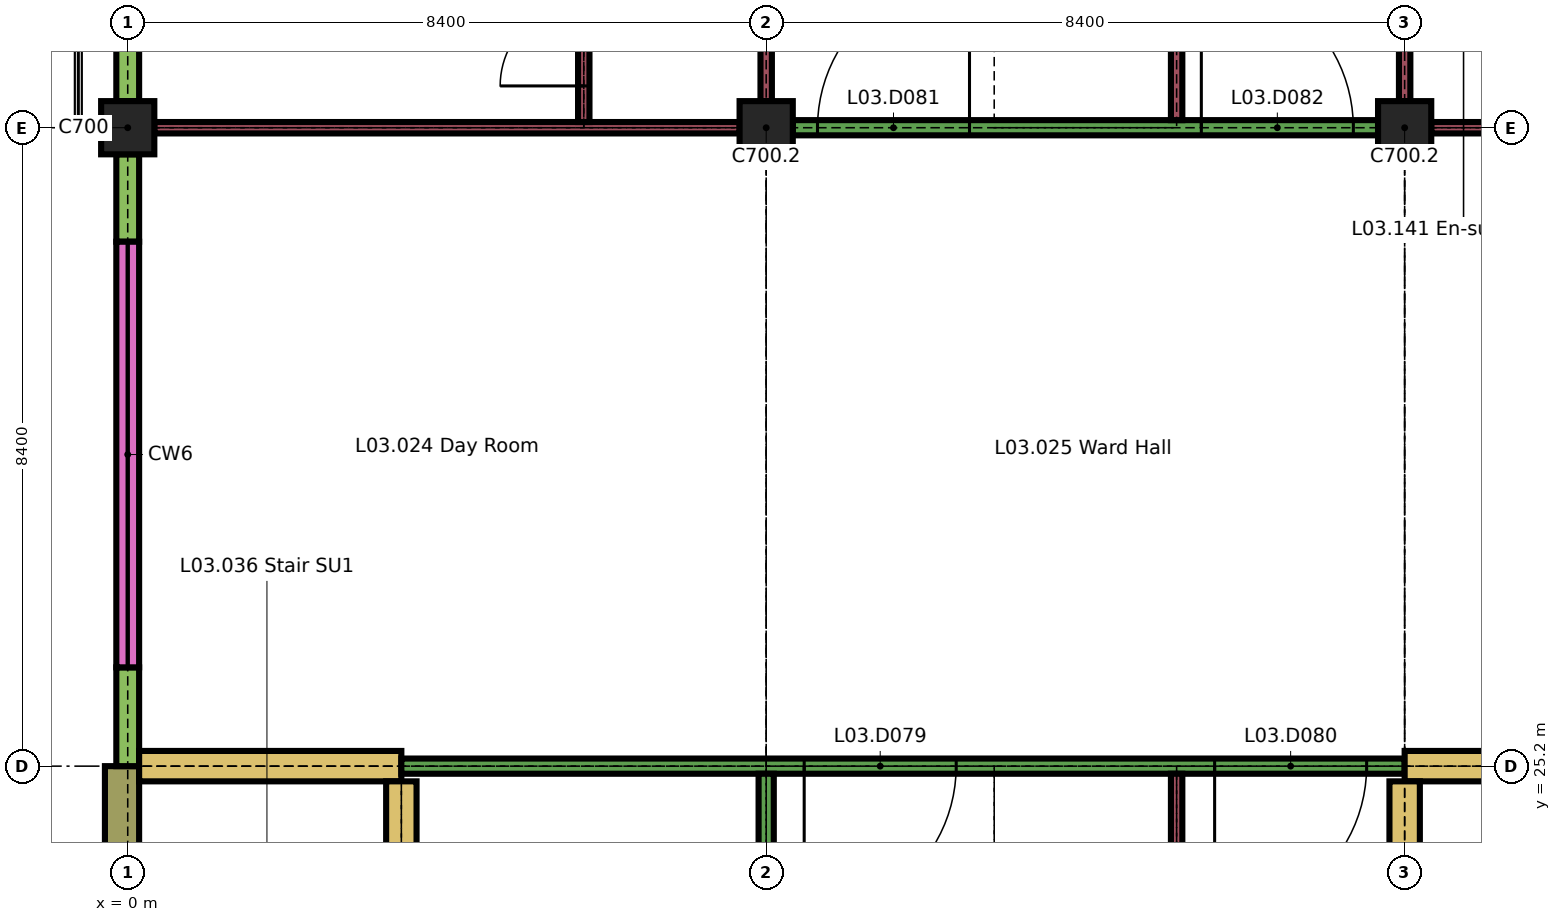
"""IFC4 building model, lengths in metres.
Left out: names, types, materials, properties, quantities, classifications, styles, units other than length and angle.
Written with IfcOpenShell. Run it as: python <this file> out.ifc"""

import sys

from ifc_helpers import new_model, si_unit, direction, frame, frame_2d, origin, origin_2d, place, context, subcontext, project, spatial, rectangle, extrude, element, fill, save


model = new_model("IFC4")
c1 = context("Model", 3, precision=1e-05, world=origin(), true_north=direction((0.0, 1.0)))
c2 = subcontext(c1, "Body", "Model", "MODEL_VIEW")
j1 = project(units=[si_unit("LENGTHUNIT", "METRE"), si_unit("PLANEANGLEUNIT", "RADIAN")], contexts=[c1])
p1 = place(None, origin())
s1 = spatial("IfcSite", under=j1, at=p1, CompositionType="ELEMENT")
p2 = place(p1, origin())
s2 = spatial("IfcBuilding", under=s1, at=p2, CompositionType="ELEMENT")
p3 = place(p2, frame((0.0, 0.0, 15.3)))
s3 = spatial("IfcBuildingStorey", under=s2, at=p3, CompositionType="ELEMENT", Elevation=15.3)
for number, where, z_axis, x_axis in (
    (1, (0.0, 33.6, 0.0), (0.0, 0.0, 1.0), (1.0, 0.0, 0.0)),
    (2, (8.4, 33.6, 0.0), (0.0, 0.0, 1.0), (1.0, 0.0, 0.0)),
    (3, (16.8, 33.6, 0.0), (0.0, 0.0, 1.0), (1.0, 0.0, 0.0)),
):
    element("IfcColumn", number, at=place(p3, frame(where, z_axis=z_axis, x_axis=x_axis)), inside=s3, PredefinedType="COLUMN", context=c2, shape_type="SweptSolid", body=[
        extrude(rectangle(XDim=0.7, YDim=0.7, at=origin_2d()), origin(), (0.0, 0.0, 1.0), 3.26),
    ])
p4 = place(p3, frame((-0.075, 21.35, 0.0), z_axis=(0.0, 0.0, 1.0), x_axis=(0.0, 1.0, 0.0)))
e4 = element("IfcWall", 4, at=p4, inside=s3, PredefinedType="SOLIDWALL", context=c2, shape_type="SweptSolid", body=[
    extrude(rectangle(XDim=3.85, YDim=0.45, at=frame_2d((1.925, 0.0))), origin(), (0.0, 0.0, 1.0), 3.26),
])
p5 = place(p3, frame((0.0, 25.2, 0.0), z_axis=(0.0, 0.0, 1.0), x_axis=(0.0, 1.0, 0.0)))
e5 = element("IfcWall", 5, at=p5, inside=s3, PredefinedType="SOLIDWALL", context=c2, shape_type="SweptSolid", body=[
    extrude(rectangle(XDim=1.3, YDim=0.3, at=frame_2d((0.65, 0.0))), origin(), (0.0, 0.0, 1.0), 2.96),
])
p6 = place(p3, frame((0.0, 32.1, 0.0), z_axis=(0.0, 0.0, 1.0), x_axis=(0.0, 1.0, 0.0)))
e6 = element("IfcWall", 6, at=p6, inside=s3, PredefinedType="SOLIDWALL", context=c2, shape_type="SweptSolid", body=[
    extrude(rectangle(XDim=1.15, YDim=0.3, at=frame_2d((0.575, 0.0))), origin(), (0.0, 0.0, 1.0), 2.96),
])
p7 = place(p3, frame((0.0, 26.5, 0.0), z_axis=(0.0, 0.0, 1.0), x_axis=(0.0, 1.0, 0.0)))
e7 = element("IfcWall", 7, at=p7, inside=s3, PredefinedType="SOLIDWALL", context=c2, shape_type="SweptSolid", body=[
    extrude(rectangle(XDim=5.6, YDim=0.3, at=frame_2d((2.8, 0.0))), origin(), (0.0, 0.0, 1.0), 0.6),
])
p8 = place(p3, frame((0.0, 33.95, 0.0), z_axis=(0.0, 0.0, 1.0), x_axis=(0.0, 1.0, 0.0)))
e8 = element("IfcWall", 8, at=p8, inside=s3, PredefinedType="SOLIDWALL", context=c2, shape_type="SweptSolid", body=[
    extrude(rectangle(XDim=3.85, YDim=0.3, at=frame_2d((1.925, 0.0))), origin(), (0.0, 0.0, 1.0), 2.96),
])
p9 = place(p8, frame((0.7, 0.0, 0.9)))
e9 = element("IfcOpeningElement", 9, at=p9, cuts=e8, PredefinedType="OPENING", context=c2, shape_type="SweptSolid", body=[
    extrude(rectangle(XDim=2.1, YDim=1.5, at=frame_2d((1.05, 0.75))), frame((0.0, 0.16, 0.0), z_axis=(0.0, -1.0, 0.0), x_axis=(1.0, 0.0, 0.0)), (0.0, 0.0, 1.0), 0.32),
])
p10 = place(p3, frame((0.15, 25.2, 0.0), z_axis=(0.0, 0.0, 1.0), x_axis=(1.0, 0.0, 0.0)))
e10 = element("IfcWall", 10, at=p10, inside=s3, PredefinedType="SHEAR", context=c2, shape_type="SweptSolid", body=[
    extrude(rectangle(XDim=3.45, YDim=0.4, at=frame_2d((1.725, 0.0))), origin(), (0.0, 0.0, 1.0), 3.26),
])
p11 = place(p3, frame((3.6, 25.2, 0.0), z_axis=(0.0, 0.0, 1.0), x_axis=(1.0, 0.0, 0.0)))
e11 = element("IfcWall", 11, at=p11, inside=s3, PredefinedType="PARTITIONING", context=c2, shape_type="SweptSolid", body=[
    extrude(rectangle(XDim=13.2, YDim=0.2, at=frame_2d((6.6, 0.0))), origin(), (0.0, 0.0, 1.0), 3.26),
])
p12 = place(p11, frame((5.3, 0.0, 0.0)))
e12 = element("IfcOpeningElement", 12, at=p12, cuts=e11, PredefinedType="OPENING", context=c2, shape_type="SweptSolid", body=[
    extrude(rectangle(XDim=2.0, YDim=2.4, at=frame_2d((1.0, 1.2))), frame((0.0, 0.11, 0.0), z_axis=(0.0, -1.0, 0.0), x_axis=(1.0, 0.0, 0.0)), (0.0, 0.0, 1.0), 0.22),
])
p13 = place(p11, frame((10.7, 0.0, 0.0)))
e13 = element("IfcOpeningElement", 13, at=p13, cuts=e11, PredefinedType="OPENING", context=c2, shape_type="SweptSolid", body=[
    extrude(rectangle(XDim=2.0, YDim=2.4, at=frame_2d((1.0, 1.2))), frame((0.0, 0.11, 0.0), z_axis=(0.0, -1.0, 0.0), x_axis=(1.0, 0.0, 0.0)), (0.0, 0.0, 1.0), 0.22),
])
p14 = place(p3, frame((16.8, 25.2, 0.0), z_axis=(0.0, 0.0, 1.0), x_axis=(1.0, 0.0, 0.0)))
e14 = element("IfcWall", 14, at=p14, inside=s3, PredefinedType="SHEAR", context=c2, shape_type="SweptSolid", body=[
    extrude(rectangle(XDim=8.4, YDim=0.4, at=frame_2d((4.2, 0.0))), origin(), (0.0, 0.0, 1.0), 3.26),
])
p15 = place(p3, frame((0.35, 33.6, 0.0), z_axis=(0.0, 0.0, 1.0), x_axis=(1.0, 0.0, 0.0)))
e15 = element("IfcWall", 15, at=p15, inside=s3, PredefinedType="PARTITIONING", context=c2, shape_type="SweptSolid", body=[
    extrude(rectangle(XDim=7.7, YDim=0.15, at=frame_2d((3.85, 0.0))), origin(), (0.0, 0.0, 1.0), 3.26),
])
p16 = place(p3, frame((8.75, 33.6, 0.0), z_axis=(0.0, 0.0, 1.0), x_axis=(1.0, 0.0, 0.0)))
e16 = element("IfcWall", 16, at=p16, inside=s3, PredefinedType="PARTITIONING", context=c2, shape_type="SweptSolid", body=[
    extrude(rectangle(XDim=7.7, YDim=0.2, at=frame_2d((3.85, 0.0))), origin(), (0.0, 0.0, 1.0), 3.26),
])
p17 = place(p16, frame((0.325, 0.0, 0.0)))
e17 = element("IfcOpeningElement", 17, at=p17, cuts=e16, PredefinedType="OPENING", context=c2, shape_type="SweptSolid", body=[
    extrude(rectangle(XDim=2.0, YDim=2.4, at=frame_2d((1.0, 1.2))), frame((0.0, 0.11, 0.0), z_axis=(0.0, -1.0, 0.0), x_axis=(1.0, 0.0, 0.0)), (0.0, 0.0, 1.0), 0.22),
])
p18 = place(p16, frame((5.375, 0.0, 0.0)))
e18 = element("IfcOpeningElement", 18, at=p18, cuts=e16, PredefinedType="OPENING", context=c2, shape_type="SweptSolid", body=[
    extrude(rectangle(XDim=2.0, YDim=2.4, at=frame_2d((1.0, 1.2))), frame((0.0, 0.11, 0.0), z_axis=(0.0, -1.0, 0.0), x_axis=(1.0, 0.0, 0.0)), (0.0, 0.0, 1.0), 0.22),
])
p19 = place(p3, frame((17.15, 33.6, 0.0), z_axis=(0.0, 0.0, 1.0), x_axis=(1.0, 0.0, 0.0)))
e19 = element("IfcWall", 19, at=p19, inside=s3, PredefinedType="PARTITIONING", context=c2, shape_type="SweptSolid", body=[
    extrude(rectangle(XDim=7.7, YDim=0.15, at=frame_2d((3.85, 0.0))), origin(), (0.0, 0.0, 1.0), 3.26),
])
p20 = place(p3, frame((3.6, 17.0, 0.0), z_axis=(0.0, 0.0, 1.0), x_axis=(0.0, 1.0, 0.0)))
e20 = element("IfcWall", 20, at=p20, inside=s3, PredefinedType="SHEAR", context=c2, shape_type="SweptSolid", body=[
    extrude(rectangle(XDim=8.0, YDim=0.4, at=frame_2d((4.0, 0.0))), origin(), (0.0, 0.0, 1.0), 3.26),
])
p21 = place(p20, frame((0.4, 0.0, 0.0)))
e21 = element("IfcOpeningElement", 21, at=p21, cuts=e20, PredefinedType="OPENING", context=c2, shape_type="SweptSolid", body=[
    extrude(rectangle(XDim=1.2, YDim=2.1, at=frame_2d((0.6, 1.05))), frame((0.0, 0.21, 0.0), z_axis=(0.0, -1.0, 0.0), x_axis=(1.0, 0.0, 0.0)), (0.0, 0.0, 1.0), 0.42),
])
p22 = place(p3, frame((6.0, 33.675, 0.0), z_axis=(0.0, 0.0, 1.0), x_axis=(0.0, 1.0, 0.0)))
e22 = element("IfcWall", 22, at=p22, inside=s3, PredefinedType="PARTITIONING", context=c2, shape_type="SweptSolid", body=[
    extrude(rectangle(XDim=2.05, YDim=0.15, at=frame_2d((1.025, 0.0))), origin(), (0.0, 0.0, 1.0), 3.26),
])
p23 = place(p22, frame((0.475, 0.0, 0.0)))
e23 = element("IfcOpeningElement", 23, at=p23, cuts=e22, PredefinedType="OPENING", context=c2, shape_type="SweptSolid", body=[
    extrude(rectangle(XDim=1.1, YDim=2.1, at=frame_2d((0.55, 1.05))), frame((0.0, 0.085, 0.0), z_axis=(0.0, -1.0, 0.0), x_axis=(1.0, 0.0, 0.0)), (0.0, 0.0, 1.0), 0.17),
])
p24 = place(p3, frame((8.4, 16.9, 0.0), z_axis=(0.0, 0.0, 1.0), x_axis=(0.0, 1.0, 0.0)))
e24 = element("IfcWall", 24, at=p24, inside=s3, PredefinedType="PARTITIONING", context=c2, shape_type="SweptSolid", body=[
    extrude(rectangle(XDim=8.2, YDim=0.2, at=frame_2d((4.1, 0.0))), origin(), (0.0, 0.0, 1.0), 3.26),
])
p25 = place(p24, frame((3.1, 0.0, 0.0)))
e25 = element("IfcOpeningElement", 25, at=p25, cuts=e24, PredefinedType="OPENING", context=c2, shape_type="SweptSolid", body=[
    extrude(rectangle(XDim=2.0, YDim=2.4, at=frame_2d((1.0, 1.2))), frame((0.0, 0.11, 0.0), z_axis=(0.0, -1.0, 0.0), x_axis=(1.0, 0.0, 0.0)), (0.0, 0.0, 1.0), 0.22),
])
p26 = place(p3, frame((8.4, 33.95, 0.0), z_axis=(0.0, 0.0, 1.0), x_axis=(0.0, 1.0, 0.0)))
e26 = element("IfcWall", 26, at=p26, inside=s3, PredefinedType="PARTITIONING", context=c2, shape_type="SweptSolid", body=[
    extrude(rectangle(XDim=7.7, YDim=0.15, at=frame_2d((3.85, 0.0))), origin(), (0.0, 0.0, 1.0), 3.26),
])
p27 = place(p26, frame((2.1, 0.0, 0.0)))
e27 = element("IfcOpeningElement", 27, at=p27, cuts=e26, PredefinedType="OPENING", context=c2, shape_type="SweptSolid", body=[
    extrude(rectangle(XDim=1.5, YDim=2.4, at=frame_2d((0.75, 1.2))), frame((0.0, 0.085, 0.0), z_axis=(0.0, -1.0, 0.0), x_axis=(1.0, 0.0, 0.0)), (0.0, 0.0, 1.0), 0.17),
])
p28 = place(p26, frame((4.1, 0.0, 0.0)))
e28 = element("IfcOpeningElement", 28, at=p28, cuts=e26, PredefinedType="OPENING", context=c2, shape_type="SweptSolid", body=[
    extrude(rectangle(XDim=1.5, YDim=2.4, at=frame_2d((0.75, 1.2))), frame((0.0, 0.085, 0.0), z_axis=(0.0, -1.0, 0.0), x_axis=(1.0, 0.0, 0.0)), (0.0, 0.0, 1.0), 0.17),
])
p29 = place(p3, frame((13.8, 16.875, 0.0), z_axis=(0.0, 0.0, 1.0), x_axis=(0.0, 1.0, 0.0)))
e29 = element("IfcWall", 29, at=p29, inside=s3, PredefinedType="PARTITIONING", context=c2, shape_type="SweptSolid", body=[
    extrude(rectangle(XDim=8.225, YDim=0.15, at=frame_2d((4.113, 0.0))), origin(), (0.0, 0.0, 1.0), 3.26),
])
p30 = place(p3, frame((13.8, 33.7, 0.0), z_axis=(0.0, 0.0, 1.0), x_axis=(0.0, 1.0, 0.0)))
e30 = element("IfcWall", 30, at=p30, inside=s3, PredefinedType="PARTITIONING", context=c2, shape_type="SweptSolid", body=[
    extrude(rectangle(XDim=50.2, YDim=0.15, at=frame_2d((25.1, 0.0))), origin(), (0.0, 0.0, 1.0), 3.26),
])
p31 = place(p30, frame((9.8, 0.0, 0.0)))
e31 = element("IfcOpeningElement", 31, at=p31, cuts=e30, PredefinedType="OPENING", context=c2, shape_type="SweptSolid", body=[
    extrude(rectangle(XDim=1.2, YDim=2.1, at=frame_2d((0.6, 1.05))), frame((0.0, 0.085, 0.0), z_axis=(0.0, -1.0, 0.0), x_axis=(1.0, 0.0, 0.0)), (0.0, 0.0, 1.0), 0.17),
])
p32 = place(p30, frame((14.0, 0.0, 0.0)))
e32 = element("IfcOpeningElement", 32, at=p32, cuts=e30, PredefinedType="OPENING", context=c2, shape_type="SweptSolid", body=[
    extrude(rectangle(XDim=1.2, YDim=2.1, at=frame_2d((0.6, 1.05))), frame((0.0, 0.085, 0.0), z_axis=(0.0, -1.0, 0.0), x_axis=(1.0, 0.0, 0.0)), (0.0, 0.0, 1.0), 0.17),
])
p33 = place(p30, frame((21.85, 0.0, 0.0)))
e33 = element("IfcOpeningElement", 33, at=p33, cuts=e30, PredefinedType="OPENING", context=c2, shape_type="SweptSolid", body=[
    extrude(rectangle(XDim=0.9, YDim=2.1, at=frame_2d((0.45, 1.05))), frame((0.0, 0.085, 0.0), z_axis=(0.0, -1.0, 0.0), x_axis=(1.0, 0.0, 0.0)), (0.0, 0.0, 1.0), 0.17),
])
p34 = place(p30, frame((33.6, 0.0, 0.0)))
e34 = element("IfcOpeningElement", 34, at=p34, cuts=e30, PredefinedType="OPENING", context=c2, shape_type="SweptSolid", body=[
    extrude(rectangle(XDim=1.2, YDim=2.1, at=frame_2d((0.6, 1.05))), frame((0.0, 0.085, 0.0), z_axis=(0.0, -1.0, 0.0), x_axis=(1.0, 0.0, 0.0)), (0.0, 0.0, 1.0), 0.17),
])
p35 = place(p30, frame((37.8, 0.0, 0.0)))
e35 = element("IfcOpeningElement", 35, at=p35, cuts=e30, PredefinedType="OPENING", context=c2, shape_type="SweptSolid", body=[
    extrude(rectangle(XDim=1.2, YDim=2.1, at=frame_2d((0.6, 1.05))), frame((0.0, 0.085, 0.0), z_axis=(0.0, -1.0, 0.0), x_axis=(1.0, 0.0, 0.0)), (0.0, 0.0, 1.0), 0.17),
])
p36 = place(p30, frame((45.65, 0.0, 0.0)))
e36 = element("IfcOpeningElement", 36, at=p36, cuts=e30, PredefinedType="OPENING", context=c2, shape_type="SweptSolid", body=[
    extrude(rectangle(XDim=0.9, YDim=2.1, at=frame_2d((0.45, 1.05))), frame((0.0, 0.085, 0.0), z_axis=(0.0, -1.0, 0.0), x_axis=(1.0, 0.0, 0.0)), (0.0, 0.0, 1.0), 0.17),
])
p37 = place(p3, frame((16.8, 21.6, 0.0), z_axis=(0.0, 0.0, 1.0), x_axis=(0.0, 1.0, 0.0)))
e37 = element("IfcWall", 37, at=p37, inside=s3, PredefinedType="SHEAR", context=c2, shape_type="SweptSolid", body=[
    extrude(rectangle(XDim=3.4, YDim=0.4, at=frame_2d((1.7, 0.0))), origin(), (0.0, 0.0, 1.0), 3.26),
])
p38 = place(p3, frame((16.8, 33.95, 0.0), z_axis=(0.0, 0.0, 1.0), x_axis=(0.0, 1.0, 0.0)))
e38 = element("IfcWall", 38, at=p38, inside=s3, PredefinedType="PARTITIONING", context=c2, shape_type="SweptSolid", body=[
    extrude(rectangle(XDim=8.05, YDim=0.15, at=frame_2d((4.025, 0.0))), origin(), (0.0, 0.0, 1.0), 3.26),
])
p39 = place(p38, frame((2.1, 0.0, 0.0)))
e39 = element("IfcOpeningElement", 39, at=p39, cuts=e38, PredefinedType="OPENING", context=c2, shape_type="SweptSolid", body=[
    extrude(rectangle(XDim=1.5, YDim=2.4, at=frame_2d((0.75, 1.2))), frame((0.0, 0.085, 0.0), z_axis=(0.0, -1.0, 0.0), x_axis=(1.0, 0.0, 0.0)), (0.0, 0.0, 1.0), 0.17),
])
p40 = place(p38, frame((4.1, 0.0, 0.0)))
e40 = element("IfcOpeningElement", 40, at=p40, cuts=e38, PredefinedType="OPENING", context=c2, shape_type="SweptSolid", body=[
    extrude(rectangle(XDim=1.5, YDim=2.4, at=frame_2d((0.75, 1.2))), frame((0.0, 0.085, 0.0), z_axis=(0.0, -1.0, 0.0), x_axis=(1.0, 0.0, 0.0)), (0.0, 0.0, 1.0), 0.17),
])
p41 = place(p12, origin())
e41 = element("IfcDoor", 41, at=p41, inside=s3, OperationType="SINGLE_SWING_LEFT", PredefinedType="DOOR", context=c2, shape_type="SweptSolid", body=[
    extrude(rectangle(XDim=2.0, YDim=2.4, at=frame_2d((1.0, 1.2))), frame((0.0, 0.03, 0.0), z_axis=(0.0, -1.0, 0.0), x_axis=(1.0, 0.0, 0.0)), (0.0, 0.0, 1.0), 0.06),
])
fill(e12, e41)
p42 = place(p13, origin())
e42 = element("IfcDoor", 42, at=p42, inside=s3, OperationType="SINGLE_SWING_LEFT", PredefinedType="DOOR", context=c2, shape_type="SweptSolid", body=[
    extrude(rectangle(XDim=2.0, YDim=2.4, at=frame_2d((1.0, 1.2))), frame((0.0, 0.03, 0.0), z_axis=(0.0, -1.0, 0.0), x_axis=(1.0, 0.0, 0.0)), (0.0, 0.0, 1.0), 0.06),
])
fill(e13, e42)
p43 = place(p17, origin())
e43 = element("IfcDoor", 43, at=p43, inside=s3, OperationType="SINGLE_SWING_LEFT", PredefinedType="DOOR", context=c2, shape_type="SweptSolid", body=[
    extrude(rectangle(XDim=2.0, YDim=2.4, at=frame_2d((1.0, 1.2))), frame((0.0, 0.03, 0.0), z_axis=(0.0, -1.0, 0.0), x_axis=(1.0, 0.0, 0.0)), (0.0, 0.0, 1.0), 0.06),
])
fill(e17, e43)
p44 = place(p18, origin())
e44 = element("IfcDoor", 44, at=p44, inside=s3, OperationType="SINGLE_SWING_RIGHT", PredefinedType="DOOR", context=c2, shape_type="SweptSolid", body=[
    extrude(rectangle(XDim=2.0, YDim=2.4, at=frame_2d((1.0, 1.2))), frame((0.0, 0.03, 0.0), z_axis=(0.0, -1.0, 0.0), x_axis=(1.0, 0.0, 0.0)), (0.0, 0.0, 1.0), 0.06),
])
fill(e18, e44)
p45 = place(p23, origin())
e45 = element("IfcDoor", 45, at=p45, inside=s3, OperationType="SINGLE_SWING_RIGHT", PredefinedType="DOOR", context=c2, shape_type="SweptSolid", body=[
    extrude(rectangle(XDim=1.1, YDim=2.1, at=frame_2d((0.55, 1.05))), frame((0.0, 0.025, 0.0), z_axis=(0.0, -1.0, 0.0), x_axis=(1.0, 0.0, 0.0)), (0.0, 0.0, 1.0), 0.05),
])
fill(e23, e45)
save(model, sys.argv[1])
